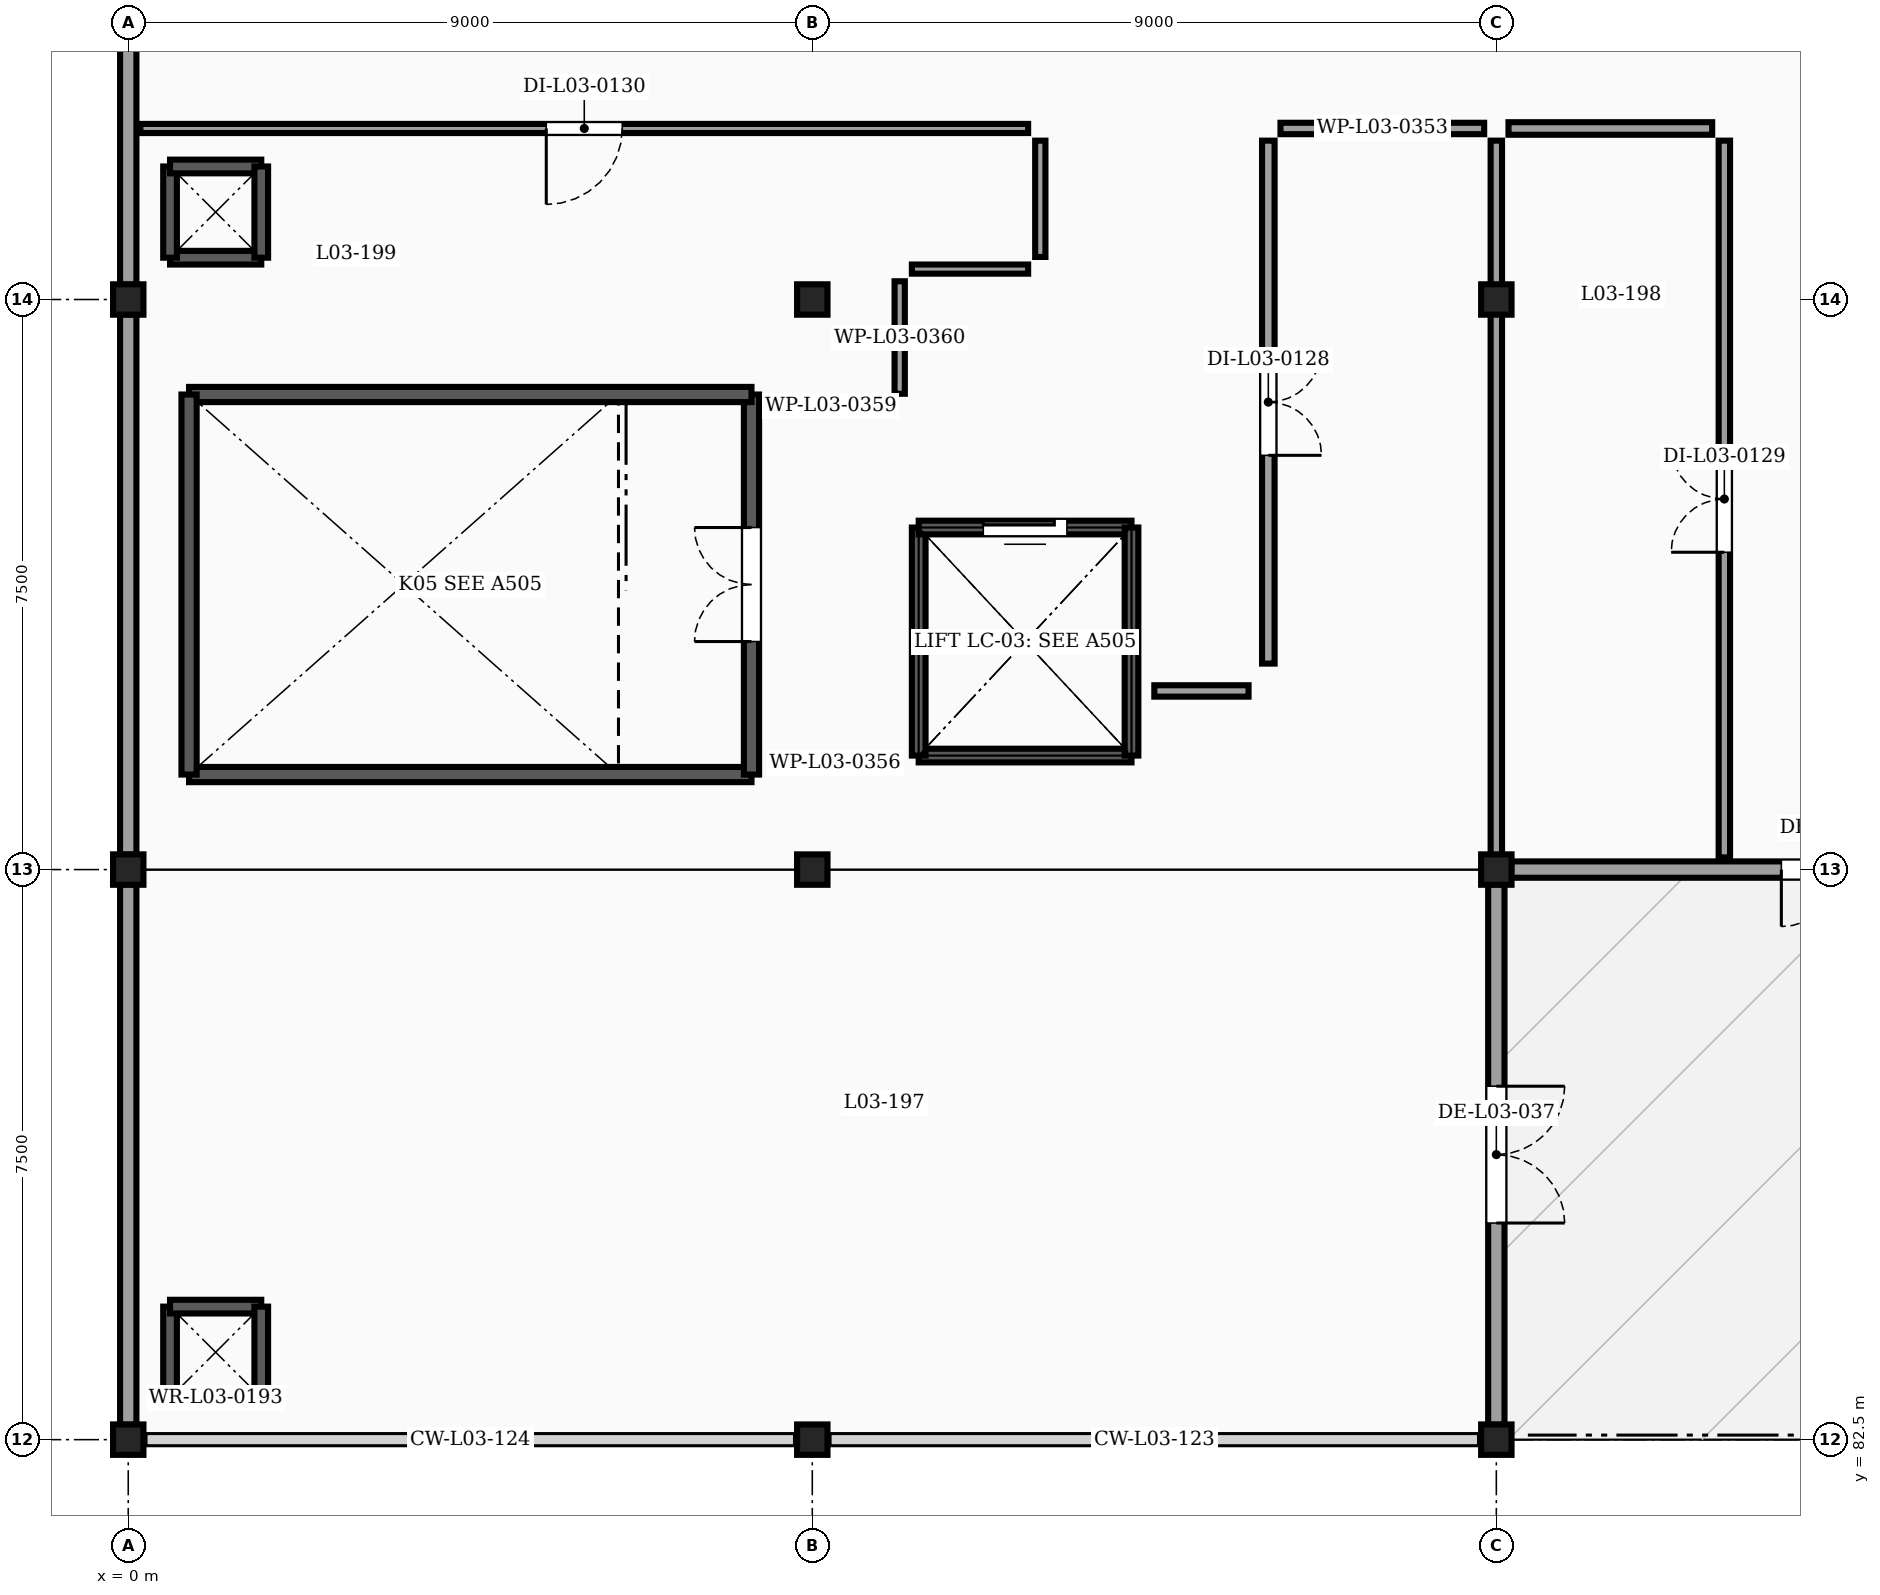
"""IFC4 building model, lengths in metres.
Left out: names, types, materials, properties, quantities, classifications, styles, units other than length and angle.
Written with IfcOpenShell. Run it as: python <this file> out.ifc"""

import sys

from ifc_helpers import new_model, si_unit, direction, frame, frame_2d, origin, origin_2d, place, context, subcontext, project, spatial, rectangle, extrude, element, fill, save


model = new_model("IFC4")
c1 = context("Model", 3, precision=1e-05, world=origin(), true_north=direction((0.0, 1.0)))
c2 = subcontext(c1, "Body", "Model", "MODEL_VIEW")
j1 = project(units=[si_unit("LENGTHUNIT", "METRE"), si_unit("PLANEANGLEUNIT", "RADIAN")], contexts=[c1])
p1 = place(None, origin())
s1 = spatial("IfcSite", under=j1, at=p1, CompositionType="ELEMENT")
p2 = place(p1, origin())
s2 = spatial("IfcBuilding", under=s1, at=p2, CompositionType="ELEMENT")
p3 = place(p2, frame((0.0, 0.0, 12.3)))
s3 = spatial("IfcBuildingStorey", under=s2, at=p3, CompositionType="ELEMENT", Elevation=12.3)
for number, where, z_axis, x_axis in (
    (1, (0.0, 82.5, 0.0), (0.0, 0.0, 1.0), (1.0, 0.0, 0.0)),
    (2, (9.0, 82.5, 0.0), (0.0, 0.0, 1.0), (1.0, 0.0, 0.0)),
    (3, (18.0, 82.5, 0.0), (0.0, 0.0, 1.0), (1.0, 0.0, 0.0)),
    (4, (0.0, 90.0, 0.0), (0.0, 0.0, 1.0), (1.0, 0.0, 0.0)),
    (5, (9.0, 90.0, 0.0), (0.0, 0.0, 1.0), (1.0, 0.0, 0.0)),
    (6, (18.0, 90.0, 0.0), (0.0, 0.0, 1.0), (1.0, 0.0, 0.0)),
    (7, (0.0, 97.5, 0.0), (0.0, 0.0, 1.0), (1.0, 0.0, 0.0)),
    (8, (9.0, 97.5, 0.0), (0.0, 0.0, 1.0), (1.0, 0.0, 0.0)),
    (9, (18.0, 97.5, 0.0), (0.0, 0.0, 1.0), (1.0, 0.0, 0.0)),
):
    element("IfcColumn", number, at=place(p3, frame(where, z_axis=z_axis, x_axis=x_axis)), inside=s3, PredefinedType="COLUMN", context=c2, shape_type="SweptSolid", body=[
        extrude(rectangle(XDim=0.4, YDim=0.4, at=origin_2d()), origin(), (0.0, 0.0, 1.0), 3.65),
    ])
p4 = place(p3, frame((26.804, 90.0, 0.0), z_axis=(0.0, 0.0, 1.0), x_axis=(-1.0, 0.0, 0.0)))
e10 = element("IfcWall", 10, at=p4, inside=s3, PredefinedType="SOLIDWALL", context=c2, shape_type="SweptSolid", body=[
    extrude(rectangle(XDim=8.608, YDim=0.215, at=frame_2d((4.304, 0.0))), origin(), (0.0, 0.0, 1.0), 3.057),
])
p5 = place(p4, frame((3.554, 0.0, 0.0)))
e11 = element("IfcOpeningElement", 11, at=p5, cuts=e10, PredefinedType="OPENING", context=c2, shape_type="SweptSolid", body=[
    extrude(rectangle(XDim=1.5, YDim=2.15, at=frame_2d((0.75, 1.075))), frame((0.0, 0.117, 0.0), z_axis=(0.0, -1.0, 0.0), x_axis=(1.0, 0.0, 0.0)), (0.0, 0.0, 1.0), 0.235),
])
p6 = place(p3, frame((18.0, 89.804, 0.0), z_axis=(0.0, 0.0, 1.0), x_axis=(0.0, -1.0, 0.0)))
e12 = element("IfcWall", 12, at=p6, inside=s3, PredefinedType="SOLIDWALL", context=c2, shape_type="SweptSolid", body=[
    extrude(rectangle(XDim=7.108, YDim=0.215, at=frame_2d((3.554, 0.0))), origin(), (0.0, 0.0, 1.0), 3.057),
])
p7 = place(p6, frame((2.654, 0.0, 0.0)))
e13 = element("IfcOpeningElement", 13, at=p7, cuts=e12, PredefinedType="OPENING", context=c2, shape_type="SweptSolid", body=[
    extrude(rectangle(XDim=1.8, YDim=2.2, at=frame_2d((0.9, 1.1))), frame((0.0, 0.117, 0.0), z_axis=(0.0, -1.0, 0.0), x_axis=(1.0, 0.0, 0.0)), (0.0, 0.0, 1.0), 0.235),
])
for number, where, z_axis, x_axis in (
    (14, (0.0, 82.696, 0.0), (0.0, 0.0, 1.0), (0.0, 1.0, 0.0)),
    (15, (0.0, 90.196, 0.0), (0.0, 0.0, 1.0), (0.0, 1.0, 0.0)),
    (16, (0.0, 97.696, 0.0), (0.0, 0.0, 1.0), (0.0, 1.0, 0.0)),
):
    element("IfcWall", number, at=place(p3, frame(where, z_axis=z_axis, x_axis=x_axis)), inside=s3, PredefinedType="SOLIDWALL", context=c2, shape_type="SweptSolid", body=[
        extrude(rectangle(XDim=7.108, YDim=0.215, at=frame_2d((3.554, 0.0))), origin(), (0.0, 0.0, 1.0), 3.057),
    ])
for number, where, z_axis, x_axis in (
    (17, (1.75, 83.05, 0.0), (0.0, 0.0, 1.0), (-1.0, 0.0, 0.0)),
    (18, (0.55, 83.05, 0.0), (0.0, 0.0, 1.0), (0.0, 1.0, 0.0)),
    (19, (0.55, 84.25, 0.0), (0.0, 0.0, 1.0), (1.0, 0.0, 0.0)),
    (20, (1.75, 84.25, 0.0), (0.0, 0.0, 1.0), (0.0, -1.0, 0.0)),
    (21, (1.75, 98.05, 0.0), (0.0, 0.0, 1.0), (-1.0, 0.0, 0.0)),
    (22, (0.55, 98.05, 0.0), (0.0, 0.0, 1.0), (0.0, 1.0, 0.0)),
    (23, (0.55, 99.25, 0.0), (0.0, 0.0, 1.0), (1.0, 0.0, 0.0)),
    (24, (1.75, 99.25, 0.0), (0.0, 0.0, 1.0), (0.0, -1.0, 0.0)),
):
    element("IfcWall", number, at=place(p3, frame(where, z_axis=z_axis, x_axis=x_axis)), inside=s3, PredefinedType="SHEAR", context=c2, shape_type="SweptSolid", body=[
        extrude(rectangle(XDim=1.2, YDim=0.18, at=frame_2d((0.6, 0.0))), origin(), (0.0, 0.0, 1.0), 3.65),
    ])
p8 = place(p3, frame((0.8, 91.25, 0.0), z_axis=(0.0, 0.0, 1.0), x_axis=(1.0, 0.0, 0.0)))
e25 = element("IfcWall", 25, at=p8, inside=s3, PredefinedType="SHEAR", context=c2, shape_type="SweptSolid", body=[
    extrude(rectangle(XDim=7.4, YDim=0.2, at=frame_2d((3.7, 0.0))), origin(), (0.0, 0.0, 1.0), 3.65),
])
p9 = place(p3, frame((8.2, 91.25, 0.0), z_axis=(0.0, 0.0, 1.0), x_axis=(0.0, 1.0, 0.0)))
e26 = element("IfcWall", 26, at=p9, inside=s3, PredefinedType="SHEAR", context=c2, shape_type="SweptSolid", body=[
    extrude(rectangle(XDim=5.0, YDim=0.2, at=frame_2d((2.5, 0.0))), origin(), (0.0, 0.0, 1.0), 3.65),
])
p10 = place(p9, frame((1.75, 0.0, 0.0)))
e27 = element("IfcOpeningElement", 27, at=p10, cuts=e26, PredefinedType="OPENING", context=c2, shape_type="SweptSolid", body=[
    extrude(rectangle(XDim=1.5, YDim=2.15, at=frame_2d((0.75, 1.075))), frame((0.0, 0.11, 0.0), z_axis=(0.0, -1.0, 0.0), x_axis=(1.0, 0.0, 0.0)), (0.0, 0.0, 1.0), 0.22),
])
p11 = place(p3, frame((8.2, 96.25, 0.0), z_axis=(0.0, 0.0, 1.0), x_axis=(-1.0, 0.0, 0.0)))
e28 = element("IfcWall", 28, at=p11, inside=s3, PredefinedType="SHEAR", context=c2, shape_type="SweptSolid", body=[
    extrude(rectangle(XDim=7.4, YDim=0.2, at=frame_2d((3.7, 0.0))), origin(), (0.0, 0.0, 1.0), 3.65),
])
p12 = place(p3, frame((0.8, 96.25, 0.0), z_axis=(0.0, 0.0, 1.0), x_axis=(0.0, -1.0, 0.0)))
e29 = element("IfcWall", 29, at=p12, inside=s3, PredefinedType="SHEAR", context=c2, shape_type="SweptSolid", body=[
    extrude(rectangle(XDim=5.0, YDim=0.2, at=frame_2d((2.5, 0.0))), origin(), (0.0, 0.0, 1.0), 3.65),
])
p13 = place(p3, frame((13.2, 91.5, 0.0), z_axis=(0.0, 0.0, 1.0), x_axis=(-1.0, 0.0, 0.0)))
e30 = element("IfcWall", 30, at=p13, inside=s3, PredefinedType="SHEAR", context=c2, shape_type="SweptSolid", body=[
    extrude(rectangle(XDim=2.8, YDim=0.18, at=frame_2d((1.4, 0.0))), origin(), (0.0, 0.0, 1.0), 3.65),
])
p14 = place(p3, frame((10.4, 91.5, 0.0), z_axis=(0.0, 0.0, 1.0), x_axis=(0.0, 1.0, 0.0)))
e31 = element("IfcWall", 31, at=p14, inside=s3, PredefinedType="SHEAR", context=c2, shape_type="SweptSolid", body=[
    extrude(rectangle(XDim=3.0, YDim=0.18, at=frame_2d((1.5, 0.0))), origin(), (0.0, 0.0, 1.0), 3.65),
])
p15 = place(p3, frame((10.4, 94.5, 0.0), z_axis=(0.0, 0.0, 1.0), x_axis=(1.0, 0.0, 0.0)))
e32 = element("IfcWall", 32, at=p15, inside=s3, PredefinedType="SHEAR", context=c2, shape_type="SweptSolid", body=[
    extrude(rectangle(XDim=2.8, YDim=0.18, at=frame_2d((1.4, 0.0))), origin(), (0.0, 0.0, 1.0), 3.65),
])
p16 = place(p15, frame((0.85, 0.0, 0.0)))
e33 = element("IfcOpeningElement", 33, at=p16, cuts=e32, PredefinedType="OPENING", context=c2, shape_type="SweptSolid", body=[
    extrude(rectangle(XDim=1.1, YDim=2.15, at=frame_2d((0.55, 1.075))), frame((0.0, 0.1, 0.0), z_axis=(0.0, -1.0, 0.0), x_axis=(1.0, 0.0, 0.0)), (0.0, 0.0, 1.0), 0.2),
])
p17 = place(p3, frame((13.2, 94.5, 0.0), z_axis=(0.0, 0.0, 1.0), x_axis=(0.0, -1.0, 0.0)))
e34 = element("IfcWall", 34, at=p17, inside=s3, PredefinedType="SHEAR", context=c2, shape_type="SweptSolid", body=[
    extrude(rectangle(XDim=3.0, YDim=0.18, at=frame_2d((1.5, 0.0))), origin(), (0.0, 0.0, 1.0), 3.65),
])
p18 = place(p3, frame((17.84, 99.75, 0.0), z_axis=(0.0, 0.0, 1.0), x_axis=(-1.0, 0.0, 0.0)))
e35 = element("IfcWall", 35, at=p18, inside=s3, PredefinedType="PARTITIONING", context=c2, shape_type="SweptSolid", body=[
    extrude(rectangle(XDim=2.68, YDim=0.15, at=frame_2d((1.34, 0.0))), origin(), (0.0, 0.0, 1.0), 3.65),
])
p19 = place(p3, frame((15.0, 99.59, 0.0), z_axis=(0.0, 0.0, 1.0), x_axis=(0.0, -1.0, 0.0)))
e36 = element("IfcWall", 36, at=p19, inside=s3, PredefinedType="PARTITIONING", context=c2, shape_type="SweptSolid", body=[
    extrude(rectangle(XDim=6.88, YDim=0.165, at=frame_2d((3.44, 0.0))), origin(), (0.0, 0.0, 1.0), 3.342),
])
p20 = place(p19, frame((2.74, 0.0, 0.0)))
e37 = element("IfcOpeningElement", 37, at=p20, cuts=e36, PredefinedType="OPENING", context=c2, shape_type="SweptSolid", body=[
    extrude(rectangle(XDim=1.4, YDim=2.15, at=frame_2d((0.7, 1.075))), frame((0.0, 0.093, 0.0), z_axis=(0.0, -1.0, 0.0), x_axis=(1.0, 0.0, 0.0)), (0.0, 0.0, 1.0), 0.185),
])
p21 = place(p3, frame((14.74, 92.35, 0.0), z_axis=(0.0, 0.0, 1.0), x_axis=(-1.0, 0.0, 0.0)))
e38 = element("IfcWall", 38, at=p21, inside=s3, PredefinedType="PARTITIONING", context=c2, shape_type="SweptSolid", body=[
    extrude(rectangle(XDim=1.24, YDim=0.15, at=frame_2d((0.62, 0.0))), origin(), (0.0, 0.0, 1.0), 3.65),
])
p22 = place(p3, frame((10.1, 91.4, 0.0), z_axis=(0.0, 0.0, 1.0), x_axis=(-1.0, 0.0, 0.0)))
e39 = element("IfcWall", 39, at=p22, inside=s3, PredefinedType="PARTITIONING", context=c2, shape_type="SweptSolid", body=[
    extrude(rectangle(XDim=1.6, YDim=0.165, at=frame_2d((0.8, 0.0))), origin(), (0.0, 0.0, 1.0), 3.65),
])
p23 = place(p3, frame((21.0, 90.16, 0.0), z_axis=(0.0, 0.0, 1.0), x_axis=(0.0, 1.0, 0.0)))
e40 = element("IfcWall", 40, at=p23, inside=s3, PredefinedType="PARTITIONING", context=c2, shape_type="SweptSolid", body=[
    extrude(rectangle(XDim=9.43, YDim=0.15, at=frame_2d((4.715, 0.0))), origin(), (0.0, 0.0, 1.0), 3.342),
])
p24 = place(p23, frame((4.015, 0.0, 0.0)))
e41 = element("IfcOpeningElement", 41, at=p24, cuts=e40, PredefinedType="OPENING", context=c2, shape_type="SweptSolid", body=[
    extrude(rectangle(XDim=1.4, YDim=2.15, at=frame_2d((0.7, 1.075))), frame((0.0, 0.085, 0.0), z_axis=(0.0, -1.0, 0.0), x_axis=(1.0, 0.0, 0.0)), (0.0, 0.0, 1.0), 0.17),
])
p25 = place(p3, frame((20.84, 99.75, 0.0), z_axis=(0.0, 0.0, 1.0), x_axis=(-1.0, 0.0, 0.0)))
e42 = element("IfcWall", 42, at=p25, inside=s3, PredefinedType="PARTITIONING", context=c2, shape_type="SweptSolid", body=[
    extrude(rectangle(XDim=2.68, YDim=0.165, at=frame_2d((1.34, 0.0))), origin(), (0.0, 0.0, 1.0), 3.65),
])
p26 = place(p3, frame((8.5, 96.1, 0.0), z_axis=(0.0, 0.0, 1.0), x_axis=(1.0, 0.0, 0.0)))
e43 = element("IfcWall", 43, at=p26, inside=s3, PredefinedType="PARTITIONING", context=c2, shape_type="SweptSolid", body=[
    extrude(rectangle(XDim=1.49, YDim=0.12, at=frame_2d((0.745, 0.0))), origin(), (0.0, 0.0, 1.0), 3.65),
])
p27 = place(p3, frame((10.15, 96.26, 0.0), z_axis=(0.0, 0.0, 1.0), x_axis=(0.0, 1.0, 0.0)))
e44 = element("IfcWall", 44, at=p27, inside=s3, PredefinedType="PARTITIONING", context=c2, shape_type="SweptSolid", body=[
    extrude(rectangle(XDim=1.48, YDim=0.135, at=frame_2d((0.74, 0.0))), origin(), (0.0, 0.0, 1.0), 3.65),
])
p28 = place(p3, frame((10.31, 97.9, 0.0), z_axis=(0.0, 0.0, 1.0), x_axis=(1.0, 0.0, 0.0)))
e45 = element("IfcWall", 45, at=p28, inside=s3, PredefinedType="PARTITIONING", context=c2, shape_type="SweptSolid", body=[
    extrude(rectangle(XDim=1.53, YDim=0.12, at=frame_2d((0.765, 0.0))), origin(), (0.0, 0.0, 1.0), 3.65),
])
p29 = place(p3, frame((12.0, 98.06, 0.0), z_axis=(0.0, 0.0, 1.0), x_axis=(0.0, 1.0, 0.0)))
e46 = element("IfcWall", 46, at=p29, inside=s3, PredefinedType="PARTITIONING", context=c2, shape_type="SweptSolid", body=[
    extrude(rectangle(XDim=1.53, YDim=0.135, at=frame_2d((0.765, 0.0))), origin(), (0.0, 0.0, 1.0), 3.342),
])
p30 = place(p3, frame((11.84, 99.75, 0.0), z_axis=(0.0, 0.0, 1.0), x_axis=(-1.0, 0.0, 0.0)))
e47 = element("IfcWall", 47, at=p30, inside=s3, PredefinedType="PARTITIONING", context=c2, shape_type="SweptSolid", body=[
    extrude(rectangle(XDim=11.68, YDim=0.12, at=frame_2d((5.84, 0.0))), origin(), (0.0, 0.0, 1.0), 3.65),
])
p31 = place(p30, frame((5.34, 0.0, 0.0)))
e48 = element("IfcOpeningElement", 48, at=p31, cuts=e47, PredefinedType="OPENING", context=c2, shape_type="SweptSolid", body=[
    extrude(rectangle(XDim=1.0, YDim=2.15, at=frame_2d((0.5, 1.075))), frame((0.0, 0.07, 0.0), z_axis=(0.0, -1.0, 0.0), x_axis=(1.0, 0.0, 0.0)), (0.0, 0.0, 1.0), 0.14),
])
p32 = place(p3, frame((18.0, 90.16, 0.0), z_axis=(0.0, 0.0, 1.0), x_axis=(0.0, 1.0, 0.0)))
e49 = element("IfcWall", 49, at=p32, inside=s3, PredefinedType="PARTITIONING", context=c2, shape_type="SweptSolid", body=[
    extrude(rectangle(XDim=9.43, YDim=0.15, at=frame_2d((4.715, 0.0))), origin(), (0.0, 0.0, 1.0), 3.192),
])
p33 = place(p5, origin())
e50 = element("IfcDoor", 50, at=p33, inside=s3, OperationType="DOUBLE_DOOR_SINGLE_SWING", PredefinedType="DOOR", context=c2, shape_type="SweptSolid", body=[
    extrude(rectangle(XDim=1.5, YDim=2.15, at=frame_2d((0.75, 1.075))), frame((0.0, 0.025, 0.0), z_axis=(0.0, -1.0, 0.0), x_axis=(1.0, 0.0, 0.0)), (0.0, 0.0, 1.0), 0.05),
])
fill(e11, e50)
p34 = place(p7, origin())
e51 = element("IfcDoor", 51, at=p34, inside=s3, OperationType="DOUBLE_DOOR_SINGLE_SWING", PredefinedType="DOOR", context=c2, shape_type="SweptSolid", body=[
    extrude(rectangle(XDim=1.8, YDim=2.2, at=frame_2d((0.9, 1.1))), frame((0.0, 0.025, 0.0), z_axis=(0.0, -1.0, 0.0), x_axis=(1.0, 0.0, 0.0)), (0.0, 0.0, 1.0), 0.05),
])
fill(e13, e51)
p35 = place(p10, origin())
e52 = element("IfcDoor", 52, at=p35, inside=s3, OperationType="DOUBLE_DOOR_SINGLE_SWING", PredefinedType="DOOR", context=c2, shape_type="SweptSolid", body=[
    extrude(rectangle(XDim=1.5, YDim=2.15, at=frame_2d((0.75, 1.075))), frame((0.0, 0.025, 0.0), z_axis=(0.0, -1.0, 0.0), x_axis=(1.0, 0.0, 0.0)), (0.0, 0.0, 1.0), 0.05),
])
fill(e27, e52)
p36 = place(p16, origin())
e53 = element("IfcDoor", 53, at=p36, inside=s3, OperationType="SLIDING_TO_LEFT", PredefinedType="DOOR", context=c2, shape_type="SweptSolid", body=[
    extrude(rectangle(XDim=1.1, YDim=2.15, at=frame_2d((0.55, 1.075))), frame((0.0, 0.025, 0.0), z_axis=(0.0, -1.0, 0.0), x_axis=(1.0, 0.0, 0.0)), (0.0, 0.0, 1.0), 0.05),
])
fill(e33, e53)
p37 = place(p20, origin())
e54 = element("IfcDoor", 54, at=p37, inside=s3, OperationType="DOUBLE_DOOR_SINGLE_SWING", PredefinedType="DOOR", context=c2, shape_type="SweptSolid", body=[
    extrude(rectangle(XDim=1.4, YDim=2.15, at=frame_2d((0.7, 1.075))), frame((0.0, 0.025, 0.0), z_axis=(0.0, -1.0, 0.0), x_axis=(1.0, 0.0, 0.0)), (0.0, 0.0, 1.0), 0.05),
])
fill(e37, e54)
p38 = place(p24, origin())
e55 = element("IfcDoor", 55, at=p38, inside=s3, OperationType="DOUBLE_DOOR_SINGLE_SWING", PredefinedType="DOOR", context=c2, shape_type="SweptSolid", body=[
    extrude(rectangle(XDim=1.4, YDim=2.15, at=frame_2d((0.7, 1.075))), frame((0.0, 0.025, 0.0), z_axis=(0.0, -1.0, 0.0), x_axis=(1.0, 0.0, 0.0)), (0.0, 0.0, 1.0), 0.05),
])
fill(e41, e55)
p39 = place(p31, origin())
e56 = element("IfcDoor", 56, at=p39, inside=s3, OperationType="SINGLE_SWING_RIGHT", PredefinedType="DOOR", context=c2, shape_type="SweptSolid", body=[
    extrude(rectangle(XDim=1.0, YDim=2.15, at=frame_2d((0.5, 1.075))), frame((0.0, 0.025, 0.0), z_axis=(0.0, -1.0, 0.0), x_axis=(1.0, 0.0, 0.0)), (0.0, 0.0, 1.0), 0.05),
])
fill(e48, e56)
save(model, sys.argv[1])
